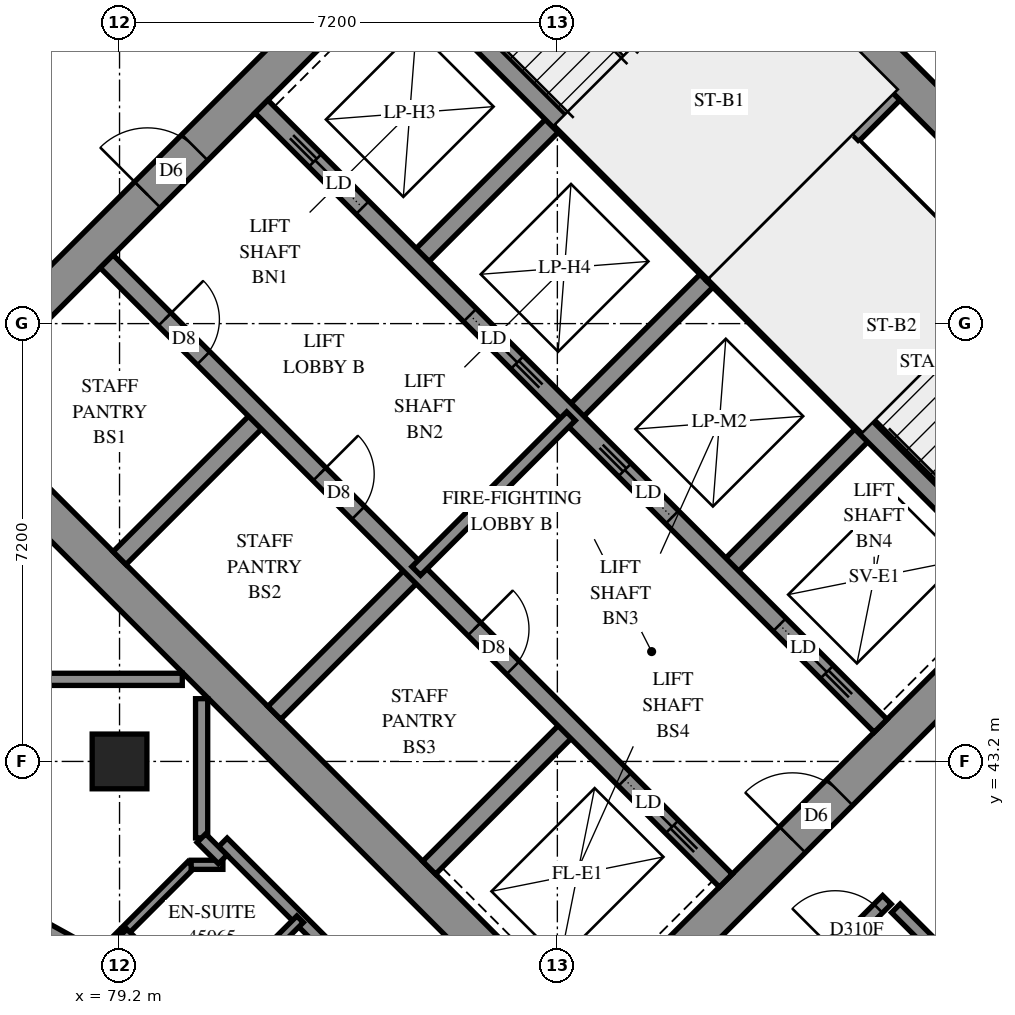
"""IFC4 building model, lengths in metres.
Left out: names, types, materials, properties, quantities, classifications, styles, units other than length and angle.
Written with IfcOpenShell. Run it as: python <this file> out.ifc"""

import sys

from ifc_helpers import new_model, si_unit, direction, frame, frame_2d, origin, origin_2d, place, context, subcontext, project, spatial, polyline, rectangle, outline, extrude, element, fill, save


model = new_model("IFC4")
c1 = context("Model", 3, precision=1e-05, world=origin(), true_north=direction((0.0, 1.0)))
c2 = subcontext(c1, "Body", "Model", "MODEL_VIEW")
j1 = project(units=[si_unit("LENGTHUNIT", "METRE"), si_unit("PLANEANGLEUNIT", "RADIAN")], contexts=[c1])
p1 = place(None, origin())
s1 = spatial("IfcSite", under=j1, at=p1, CompositionType="ELEMENT")
p2 = place(p1, origin())
s2 = spatial("IfcBuilding", under=s1, at=p2, CompositionType="ELEMENT")
p3 = place(p2, frame((0.0, 0.0, 166.0)))
s3 = spatial("IfcBuildingStorey", under=s2, at=p3, CompositionType="ELEMENT", Elevation=166.0)
p4 = place(p3, frame((79.2, 43.2, 0.0), z_axis=(0.0, 0.0, 1.0), x_axis=(1.0, 0.0, 0.0)))
e1 = element("IfcColumn", 1, at=p4, inside=s3, PredefinedType="COLUMN", context=c2, shape_type="SweptSolid", body=[
    extrude(rectangle(XDim=0.9, YDim=0.9, at=origin_2d()), origin(), (0.0, 0.0, 1.0), 3.1),
])
p5 = place(p3, frame((76.018, 49.302, -0.3), z_axis=(0.0, 0.0, 1.0), x_axis=(0.7071067812, -0.7071067812, 0.0)))
e2 = element("IfcWall", 2, at=p5, inside=s3, PredefinedType="SHEAR", context=c2, shape_type="SweptSolid", body=[
    extrude(rectangle(XDim=15.6, YDim=0.6, at=frame_2d((7.8, 0.0))), origin(), (0.0, 0.0, 1.0), 2.7),
])
p6 = place(p3, frame((86.625, 59.908, -0.3), z_axis=(0.0, 0.0, 1.0), x_axis=(0.7071067812, -0.7071067812, 0.0)))
e3 = element("IfcWall", 3, at=p6, inside=s3, PredefinedType="SHEAR", context=c2, shape_type="SweptSolid", body=[
    extrude(rectangle(XDim=15.6, YDim=0.6, at=frame_2d((7.8, 0.0))), origin(), (0.0, 0.0, 1.0), 2.7),
])
p7 = place(p6, frame((10.6, 0.0, 0.3)))
e4 = element("IfcOpeningElement", 4, at=p7, cuts=e3, PredefinedType="OPENING", context=c2, shape_type="SweptSolid", body=[
    extrude(rectangle(XDim=0.8, YDim=2.1, at=frame_2d((0.4, 1.05))), frame((0.0, 0.31, 0.0), z_axis=(0.0, -1.0, 0.0), x_axis=(1.0, 0.0, 0.0)), (0.0, 0.0, 1.0), 0.62),
])
p8 = place(p3, frame((76.442, 49.302, -0.3), z_axis=(0.0, 0.0, 1.0), x_axis=(0.7071067812, 0.7071067812, 0.0)))
e5 = element("IfcWall", 5, at=p8, inside=s3, PredefinedType="SHEAR", context=c2, shape_type="SweptSolid", body=[
    extrude(rectangle(XDim=14.4, YDim=0.6, at=frame_2d((7.2, 0.0))), origin(), (0.0, 0.0, 1.0), 2.7),
])
p9 = place(p8, frame((4.55, 0.0, 0.3)))
e6 = element("IfcOpeningElement", 6, at=p9, cuts=e5, PredefinedType="OPENING", context=c2, shape_type="SweptSolid", body=[
    extrude(rectangle(XDim=1.1, YDim=2.1, at=frame_2d((0.55, 1.05))), frame((0.0, 0.31, 0.0), z_axis=(0.0, -1.0, 0.0), x_axis=(1.0, 0.0, 0.0)), (0.0, 0.0, 1.0), 0.62),
])
p10 = place(p8, frame((11.35, 0.0, 0.3)))
e7 = element("IfcOpeningElement", 7, at=p10, cuts=e5, PredefinedType="OPENING", context=c2, shape_type="SweptSolid", body=[
    extrude(rectangle(XDim=1.1, YDim=2.1, at=frame_2d((0.55, 1.05))), frame((0.0, 0.31, 0.0), z_axis=(0.0, -1.0, 0.0), x_axis=(1.0, 0.0, 0.0)), (0.0, 0.0, 1.0), 0.62),
])
p11 = place(p3, frame((87.049, 38.695, -0.3), z_axis=(0.0, 0.0, 1.0), x_axis=(0.7071067812, 0.7071067812, 0.0)))
e8 = element("IfcWall", 8, at=p11, inside=s3, PredefinedType="SHEAR", context=c2, shape_type="SweptSolid", body=[
    extrude(rectangle(XDim=14.4, YDim=0.6, at=frame_2d((7.2, 0.0))), origin(), (0.0, 0.0, 1.0), 2.7),
])
p12 = place(p11, frame((4.55, 0.0, 0.3)))
e9 = element("IfcOpeningElement", 9, at=p12, cuts=e8, PredefinedType="OPENING", context=c2, shape_type="SweptSolid", body=[
    extrude(rectangle(XDim=1.1, YDim=2.1, at=frame_2d((0.55, 1.05))), frame((0.0, 0.31, 0.0), z_axis=(0.0, -1.0, 0.0), x_axis=(1.0, 0.0, 0.0)), (0.0, 0.0, 1.0), 0.62),
])
p13 = place(p11, frame((11.35, 0.0, 0.3)))
e10 = element("IfcOpeningElement", 10, at=p13, cuts=e8, PredefinedType="OPENING", context=c2, shape_type="SweptSolid", body=[
    extrude(rectangle(XDim=1.1, YDim=2.1, at=frame_2d((0.55, 1.05))), frame((0.0, 0.31, 0.0), z_axis=(0.0, -1.0, 0.0), x_axis=(1.0, 0.0, 0.0)), (0.0, 0.0, 1.0), 0.62),
])
for number, where, z_axis, x_axis in (
    (11, (79.2, 46.544, 0.0), (0.0, 0.0, 1.0), (0.707, 0.707, 0.0)),
    (12, (84.079, 51.423, 0.0), (0.0, 0.0, 1.0), (0.707, 0.707, 0.0)),
):
    element("IfcWall", number, at=place(p3, frame(where, z_axis=z_axis, x_axis=x_axis)), inside=s3, PredefinedType="SOLIDWALL", context=c2, shape_type="SweptSolid", body=[
        extrude(rectangle(XDim=3.3, YDim=0.3, at=frame_2d((1.65, 0.0))), origin(), (0.0, 0.0, 1.0), 3.1),
    ])
p14 = place(p3, frame((81.746, 43.999, 0.0), z_axis=(0.0, 0.0, 1.0), x_axis=(0.7071067812, 0.7071067812, 0.0)))
e13 = element("IfcWall", 13, at=p14, inside=s3, PredefinedType="SOLIDWALL", context=c2, shape_type="SweptSolid", body=[
    extrude(rectangle(XDim=3.3, YDim=0.3, at=frame_2d((1.65, 0.0))), origin(), (0.0, 0.0, 1.0), 3.1),
])
p15 = place(p3, frame((86.625, 48.878, 0.0), z_axis=(0.0, 0.0, 1.0), x_axis=(0.7071067812, 0.7071067812, 0.0)))
e14 = element("IfcWall", 14, at=p15, inside=s3, PredefinedType="SOLIDWALL", context=c2, shape_type="SweptSolid", body=[
    extrude(rectangle(XDim=3.3, YDim=0.3, at=frame_2d((1.65, 0.0))), origin(), (0.0, 0.0, 1.0), 3.1),
])
p16 = place(p3, frame((84.291, 41.453, 0.0), z_axis=(0.0, 0.0, 1.0), x_axis=(0.7071067812, 0.7071067812, 0.0)))
e15 = element("IfcWall", 15, at=p16, inside=s3, PredefinedType="SOLIDWALL", context=c2, shape_type="SweptSolid", body=[
    extrude(rectangle(XDim=3.3, YDim=0.3, at=frame_2d((1.65, 0.0))), origin(), (0.0, 0.0, 1.0), 3.1),
])
p17 = place(p3, frame((89.17, 46.332, 0.0), z_axis=(0.0, 0.0, 1.0), x_axis=(0.7071067812, 0.7071067812, 0.0)))
e16 = element("IfcWall", 16, at=p17, inside=s3, PredefinedType="SOLIDWALL", context=c2, shape_type="SweptSolid", body=[
    extrude(rectangle(XDim=3.3, YDim=0.3, at=frame_2d((1.65, 0.0))), origin(), (0.0, 0.0, 1.0), 3.1),
])
p18 = place(p3, frame((78.988, 51.423, 0.0), z_axis=(0.0, 0.0, 1.0), x_axis=(0.7071067812, -0.7071067812, 0.0)))
e17 = element("IfcWall", 17, at=p18, inside=s3, PredefinedType="SOLIDWALL", context=c2, shape_type="SweptSolid", body=[
    extrude(rectangle(XDim=14.4, YDim=0.3, at=frame_2d((7.2, 0.0))), origin(), (0.0, 0.0, 1.0), 3.1),
])
p19 = place(p18, frame((1.35, 0.0, 0.0)))
e18 = element("IfcOpeningElement", 18, at=p19, cuts=e17, PredefinedType="OPENING", context=c2, shape_type="SweptSolid", body=[
    extrude(rectangle(XDim=0.9, YDim=2.1, at=frame_2d((0.45, 1.05))), frame((0.0, 0.16, 0.0), z_axis=(0.0, -1.0, 0.0), x_axis=(1.0, 0.0, 0.0)), (0.0, 0.0, 1.0), 0.32),
])
p20 = place(p18, frame((4.95, 0.0, 0.0)))
e19 = element("IfcOpeningElement", 19, at=p20, cuts=e17, PredefinedType="OPENING", context=c2, shape_type="SweptSolid", body=[
    extrude(rectangle(XDim=0.9, YDim=2.1, at=frame_2d((0.45, 1.05))), frame((0.0, 0.16, 0.0), z_axis=(0.0, -1.0, 0.0), x_axis=(1.0, 0.0, 0.0)), (0.0, 0.0, 1.0), 0.32),
])
p21 = place(p18, frame((8.55, 0.0, 0.0)))
e20 = element("IfcOpeningElement", 20, at=p21, cuts=e17, PredefinedType="OPENING", context=c2, shape_type="SweptSolid", body=[
    extrude(rectangle(XDim=0.9, YDim=2.1, at=frame_2d((0.45, 1.05))), frame((0.0, 0.16, 0.0), z_axis=(0.0, -1.0, 0.0), x_axis=(1.0, 0.0, 0.0)), (0.0, 0.0, 1.0), 0.32),
])
p22 = place(p18, frame((12.05, 0.0, 0.0)))
e21 = element("IfcOpeningElement", 21, at=p22, cuts=e17, PredefinedType="OPENING", context=c2, shape_type="SweptSolid", body=[
    extrude(rectangle(XDim=1.1, YDim=2.1, at=frame_2d((0.55, 1.05))), frame((0.0, 0.16, 0.0), z_axis=(0.0, -1.0, 0.0), x_axis=(1.0, 0.0, 0.0)), (0.0, 0.0, 1.0), 0.32),
])
p23 = place(p3, frame((81.534, 53.969, 0.0), z_axis=(0.0, 0.0, 1.0), x_axis=(0.707103309, -0.7071102534, 0.0)))
e22 = element("IfcWall", 22, at=p23, inside=s3, PredefinedType="SOLIDWALL", context=c2, shape_type="SweptSolid", body=[
    extrude(rectangle(XDim=14.4, YDim=0.3, at=frame_2d((7.2, 0.0))), origin(), (0.0, 0.0, 1.0), 3.1),
])
p24 = place(p23, frame((1.25, 0.0, 0.0)))
e23 = element("IfcOpeningElement", 23, at=p24, cuts=e22, PredefinedType="OPENING", context=c2, shape_type="SweptSolid", body=[
    extrude(rectangle(XDim=1.1, YDim=2.1, at=frame_2d((0.55, 1.05))), frame((0.0, 0.16, 0.0), z_axis=(0.0, -1.0, 0.0), x_axis=(1.0, 0.0, 0.0)), (0.0, 0.0, 1.0), 0.32),
])
p25 = place(p23, frame((4.85, 0.0, 0.0)))
e24 = element("IfcOpeningElement", 24, at=p25, cuts=e22, PredefinedType="OPENING", context=c2, shape_type="SweptSolid", body=[
    extrude(rectangle(XDim=1.1, YDim=2.1, at=frame_2d((0.55, 1.05))), frame((0.0, 0.16, 0.0), z_axis=(0.0, -1.0, 0.0), x_axis=(1.0, 0.0, 0.0)), (0.0, 0.0, 1.0), 0.32),
])
p26 = place(p23, frame((8.45, 0.0, 0.0)))
e25 = element("IfcOpeningElement", 25, at=p26, cuts=e22, PredefinedType="OPENING", context=c2, shape_type="SweptSolid", body=[
    extrude(rectangle(XDim=1.1, YDim=2.1, at=frame_2d((0.55, 1.05))), frame((0.0, 0.16, 0.0), z_axis=(0.0, -1.0, 0.0), x_axis=(1.0, 0.0, 0.0)), (0.0, 0.0, 1.0), 0.32),
])
p27 = place(p23, frame((12.05, 0.0, 0.0)))
e26 = element("IfcOpeningElement", 26, at=p27, cuts=e22, PredefinedType="OPENING", context=c2, shape_type="SweptSolid", body=[
    extrude(rectangle(XDim=1.1, YDim=2.1, at=frame_2d((0.55, 1.05))), frame((0.0, 0.16, 0.0), z_axis=(0.0, -1.0, 0.0), x_axis=(1.0, 0.0, 0.0)), (0.0, 0.0, 1.0), 0.32),
])
for number, where, z_axis, x_axis in (
    (27, (83.867, 56.302, 0.0), (0.0, 0.0, 1.0), (0.707, -0.707, 0.0)),
    (28, (88.958, 51.211, 0.0), (0.0, 0.0, 1.0), (0.707, -0.707, 0.0)),
):
    element("IfcWall", number, at=place(p3, frame(where, z_axis=z_axis, x_axis=x_axis)), inside=s3, PredefinedType="SOLIDWALL", context=c2, shape_type="SweptSolid", body=[
        extrude(rectangle(XDim=7.2, YDim=0.3, at=frame_2d((3.6, 0.0))), origin(), (0.0, 0.0, 1.0), 3.1),
    ])
p28 = place(p3, frame((88.958, 51.211, 0.0), z_axis=(0.0, 0.0, 1.0), x_axis=(0.7071067812, 0.7071067812, 0.0)))
e29 = element("IfcWall", 29, at=p28, inside=s3, PredefinedType="SOLIDWALL", context=c2, shape_type="SweptSolid", body=[
    extrude(rectangle(XDim=4.2, YDim=0.3, at=frame_2d((2.1, 0.0))), origin(), (0.0, 0.0, 1.0), 3.1),
])
p29 = place(p3, frame((76.572, 41.057, 0.0), z_axis=(0.0, 0.0, 1.0), x_axis=(0.8758607795, -0.4825638765, 0.0)))
e30 = element("IfcWall", 30, at=p29, inside=s3, PredefinedType="SOLIDWALL", context=c2, shape_type="SweptSolid", body=[
    extrude(outline(polyline([(0.022, -0.25), (4.236, -0.25), (4.343, 0.25), (-0.022, 0.25), (0.022, -0.25)])), origin(), (0.0, 0.0, 1.0), 3.1),
])
p30 = place(p29, frame((0.322, 0.0, 0.45)))
e31 = element("IfcOpeningElement", 31, at=p30, cuts=e30, PredefinedType="OPENING", context=c2, shape_type="SweptSolid", body=[
    extrude(rectangle(XDim=1.2, YDim=2.5, at=frame_2d((0.6, 1.25))), frame((0.0, 0.26, 0.0), z_axis=(0.0, -1.0, 0.0), x_axis=(1.0, 0.0, 0.0)), (0.0, 0.0, 1.0), 0.52),
])
p31 = place(p29, frame((2.666, 0.0, 0.45)))
e32 = element("IfcOpeningElement", 32, at=p31, cuts=e30, PredefinedType="OPENING", context=c2, shape_type="SweptSolid", body=[
    extrude(rectangle(XDim=1.2, YDim=2.5, at=frame_2d((0.6, 1.25))), frame((0.0, 0.26, 0.0), z_axis=(0.0, -1.0, 0.0), x_axis=(1.0, 0.0, 0.0)), (0.0, 0.0, 1.0), 0.52),
])
p32 = place(p3, frame((91.313, 53.354, 0.0), z_axis=(0.0, 0.0, 1.0), x_axis=(0.7071140275, -0.7070995348, 0.0)))
e33 = element("IfcWall", 33, at=p32, inside=s3, PredefinedType="PARTITIONING", context=c2, shape_type="SweptSolid", body=[
    extrude(rectangle(XDim=6.9, YDim=0.15, at=frame_2d((3.45, 0.0))), origin(), (0.0, 0.0, 1.0), 3.1),
])
p33 = place(p3, frame((84.079, 46.332, 0.0), z_axis=(0.0, 0.0, 1.0), x_axis=(0.7071067812, 0.7071067812, 0.0)))
e34 = element("IfcWall", 34, at=p33, inside=s3, PredefinedType="PARTITIONING", context=c2, shape_type="SweptSolid", body=[
    extrude(rectangle(XDim=3.6, YDim=0.2, at=frame_2d((1.8, 0.0))), origin(), (0.0, 0.0, 1.0), 3.1),
])
p34 = place(p3, frame((91.967, 40.785, 0.0), z_axis=(0.0, 0.0, 1.0), x_axis=(0.7071067812, -0.7071067812, 0.0)))
e35 = element("IfcWall", 35, at=p34, inside=s3, PredefinedType="PARTITIONING", context=c2, shape_type="SweptSolid", body=[
    extrude(rectangle(XDim=12.1, YDim=0.2, at=frame_2d((6.05, 0.0))), origin(), (0.0, 0.0, 1.0), 3.1),
])
p35 = place(p34, frame((3.448, 0.0, 0.0)))
e36 = element("IfcOpeningElement", 36, at=p35, cuts=e35, PredefinedType="OPENING", context=c2, shape_type="SweptSolid", body=[
    extrude(rectangle(XDim=0.9, YDim=2.1, at=frame_2d((0.45, 1.05))), frame((0.0, 0.11, 0.0), z_axis=(0.0, -1.0, 0.0), x_axis=(1.0, 0.0, 0.0)), (0.0, 0.0, 1.0), 0.22),
])
p36 = place(p34, frame((8.457, 0.0, 0.0)))
e37 = element("IfcOpeningElement", 37, at=p36, cuts=e35, PredefinedType="OPENING", context=c2, shape_type="SweptSolid", body=[
    extrude(rectangle(XDim=1.0, YDim=2.1, at=frame_2d((0.5, 1.05))), frame((0.0, 0.11, 0.0), z_axis=(0.0, -1.0, 0.0), x_axis=(1.0, 0.0, 0.0)), (0.0, 0.0, 1.0), 0.22),
])
p37 = place(p3, frame((91.755, 57.317, 0.0), z_axis=(0.0, 0.0, 1.0), x_axis=(0.7071067812, -0.7071067812, 0.0)))
e38 = element("IfcWall", 38, at=p37, inside=s3, PredefinedType="PARTITIONING", context=c2, shape_type="SweptSolid", body=[
    extrude(rectangle(XDim=11.639, YDim=0.2, at=frame_2d((5.819, 0.0))), origin(), (0.0, 0.0, 1.0), 3.1),
])
p38 = place(p3, frame((80.899, 41.869, 0.0), z_axis=(0.0, 0.0, 1.0), x_axis=(0.7071067812, -0.7071067812, 0.0)))
e39 = element("IfcWall", 39, at=p38, inside=s3, PredefinedType="PARTITIONING", context=c2, shape_type="SweptSolid", body=[
    extrude(rectangle(XDim=8.392, YDim=0.2, at=frame_2d((4.196, 0.0))), origin(), (0.0, 0.0, 1.0), 3.1),
])
p39 = place(p38, frame((4.979, 0.0, 0.0)))
e40 = element("IfcOpeningElement", 40, at=p39, cuts=e39, PredefinedType="OPENING", context=c2, shape_type="SweptSolid", body=[
    extrude(rectangle(XDim=0.9, YDim=2.1, at=frame_2d((0.45, 1.05))), frame((0.0, 0.11, 0.0), z_axis=(0.0, -1.0, 0.0), x_axis=(1.0, 0.0, 0.0)), (0.0, 0.0, 1.0), 0.22),
])
p40 = place(p3, frame((86.834, 35.94, 0.0), z_axis=(0.0, 0.0, 1.0), x_axis=(0.7072486139, 0.7069649201, 0.0)))
e41 = element("IfcWall", 41, at=p40, inside=s3, PredefinedType="PARTITIONING", context=c2, shape_type="SweptSolid", body=[
    extrude(rectangle(XDim=7.05, YDim=0.2, at=frame_2d((3.525, 0.0))), origin(), (0.0, 0.0, 1.0), 3.1),
])
p41 = place(p40, frame((5.848, 0.0, 0.0)))
e42 = element("IfcOpeningElement", 42, at=p41, cuts=e41, PredefinedType="OPENING", context=c2, shape_type="SweptSolid", body=[
    extrude(rectangle(XDim=1.0, YDim=2.1, at=frame_2d((0.5, 1.05))), frame((0.0, 0.11, 0.0), z_axis=(0.0, -1.0, 0.0), x_axis=(1.0, 0.0, 0.0)), (0.0, 0.0, 1.0), 0.22),
])
for number, where, z_axis, x_axis in (
    (43, (77.942, 44.55, 0.0), (0.0, 0.0, 1.0), (1.0, 0.0, 0.0)),
    (44, (80.55, 41.942, 0.0), (0.0, 0.0, 1.0), (0.0, 1.0, 0.0)),
):
    element("IfcWall", number, at=place(p3, frame(where, z_axis=z_axis, x_axis=x_axis)), inside=s3, PredefinedType="PARTITIONING", context=c2, shape_type="SweptSolid", body=[
        extrude(rectangle(XDim=2.29, YDim=0.2, at=frame_2d((1.145, 0.0))), origin(), (0.0, 0.0, 1.0), 3.1),
    ])
p42 = place(p3, frame((80.603, 39.039, 0.0), z_axis=(0.0, 0.0, 1.0), x_axis=(0.7071293598, 0.7070842018, 0.0)))
e45 = element("IfcWall", 45, at=p42, inside=s3, PredefinedType="PARTITIONING", context=c2, shape_type="SweptSolid", body=[
    extrude(rectangle(XDim=2.214, YDim=0.15, at=frame_2d((1.107, 0.0))), origin(), (0.0, 0.0, 1.0), 3.1),
])
p43 = place(p42, frame((0.177, 0.0, 0.0)))
e46 = element("IfcOpeningElement", 46, at=p43, cuts=e45, PredefinedType="OPENING", context=c2, shape_type="SweptSolid", body=[
    extrude(rectangle(XDim=0.8, YDim=2.1, at=frame_2d((0.4, 1.05))), frame((0.0, 0.085, 0.0), z_axis=(0.0, -1.0, 0.0), x_axis=(1.0, 0.0, 0.0)), (0.0, 0.0, 1.0), 0.17),
])
p44 = place(p3, frame((78.924, 40.047, 0.0), z_axis=(0.0, 0.0, 1.0), x_axis=(0.7071067812, 0.7071067812, 0.0)))
e47 = element("IfcWall", 47, at=p44, inside=s3, PredefinedType="PARTITIONING", context=c2, shape_type="SweptSolid", body=[
    extrude(rectangle(XDim=2.056, YDim=0.15, at=frame_2d((1.028, 0.0))), origin(), (0.0, 0.0, 1.0), 3.1),
])
p45 = place(p3, frame((79.267, 40.389, 0.0), z_axis=(0.0, 0.0, 1.0), x_axis=(0.7071375765, -0.7070759845, 0.0)))
e48 = element("IfcWall", 48, at=p45, inside=s3, PredefinedType="PARTITIONING", context=c2, shape_type="SweptSolid", body=[
    extrude(rectangle(XDim=1.624, YDim=0.15, at=frame_2d((0.812, 0.0))), origin(), (0.0, 0.0, 1.0), 3.1),
])
p46 = place(p3, frame((80.378, 41.5, 0.0), z_axis=(0.0, 0.0, 1.0), x_axis=(1.0, 0.0, 0.0)))
e49 = element("IfcWall", 49, at=p46, inside=s3, PredefinedType="PARTITIONING", context=c2, shape_type="SweptSolid", body=[
    extrude(rectangle(XDim=0.522, YDim=0.15, at=frame_2d((0.261, 0.0))), origin(), (0.0, 0.0, 1.0), 3.1),
])
p47 = place(p3, frame((80.546, 41.938, 0.0), z_axis=(0.0, 0.0, 1.0), x_axis=(0.7071067812, -0.7071067812, 0.0)))
e50 = element("IfcWall", 50, at=p47, inside=s3, PredefinedType="PARTITIONING", context=c2, shape_type="SweptSolid", body=[
    extrude(rectangle(XDim=0.495, YDim=0.2, at=frame_2d((0.247, 0.0))), origin(), (0.0, 0.0, 1.0), 3.1),
])
p48 = place(p9, origin())
e51 = element("IfcDoor", 51, at=p48, inside=s3, OperationType="DOUBLE_DOOR_SINGLE_SWING", PredefinedType="DOOR", context=c2, shape_type="SweptSolid", body=[
    extrude(rectangle(XDim=1.1, YDim=2.1, at=frame_2d((0.55, 1.05))), frame((0.0, 0.025, 0.0), z_axis=(0.0, -1.0, 0.0), x_axis=(1.0, 0.0, 0.0)), (0.0, 0.0, 1.0), 0.05),
])
fill(e6, e51)
p49 = place(p12, origin())
e52 = element("IfcDoor", 52, at=p49, inside=s3, OperationType="DOUBLE_DOOR_SINGLE_SWING", PredefinedType="DOOR", context=c2, shape_type="SweptSolid", body=[
    extrude(rectangle(XDim=1.1, YDim=2.1, at=frame_2d((0.55, 1.05))), frame((0.0, 0.025, 0.0), z_axis=(0.0, -1.0, 0.0), x_axis=(1.0, 0.0, 0.0)), (0.0, 0.0, 1.0), 0.05),
])
fill(e9, e52)
p50 = place(p19, origin())
e53 = element("IfcDoor", 53, at=p50, inside=s3, OperationType="SINGLE_SWING_LEFT", PredefinedType="DOOR", context=c2, shape_type="SweptSolid", body=[
    extrude(rectangle(XDim=0.9, YDim=2.1, at=frame_2d((0.45, 1.05))), frame((0.0, 0.025, 0.0), z_axis=(0.0, -1.0, 0.0), x_axis=(1.0, 0.0, 0.0)), (0.0, 0.0, 1.0), 0.05),
])
fill(e18, e53)
p51 = place(p20, origin())
e54 = element("IfcDoor", 54, at=p51, inside=s3, OperationType="SINGLE_SWING_LEFT", PredefinedType="DOOR", context=c2, shape_type="SweptSolid", body=[
    extrude(rectangle(XDim=0.9, YDim=2.1, at=frame_2d((0.45, 1.05))), frame((0.0, 0.025, 0.0), z_axis=(0.0, -1.0, 0.0), x_axis=(1.0, 0.0, 0.0)), (0.0, 0.0, 1.0), 0.05),
])
fill(e19, e54)
p52 = place(p21, origin())
e55 = element("IfcDoor", 55, at=p52, inside=s3, OperationType="SINGLE_SWING_LEFT", PredefinedType="DOOR", context=c2, shape_type="SweptSolid", body=[
    extrude(rectangle(XDim=0.9, YDim=2.1, at=frame_2d((0.45, 1.05))), frame((0.0, 0.025, 0.0), z_axis=(0.0, -1.0, 0.0), x_axis=(1.0, 0.0, 0.0)), (0.0, 0.0, 1.0), 0.05),
])
fill(e20, e55)
p53 = place(p22, origin())
e56 = element("IfcDoor", 56, at=p53, inside=s3, OperationType="SLIDING_TO_RIGHT", PredefinedType="DOOR", context=c2, shape_type="SweptSolid", body=[
    extrude(rectangle(XDim=1.1, YDim=2.1, at=frame_2d((0.55, 1.05))), frame((0.0, 0.025, 0.0), z_axis=(0.0, -1.0, 0.0), x_axis=(1.0, 0.0, 0.0)), (0.0, 0.0, 1.0), 0.05),
])
fill(e21, e56)
p54 = place(p24, origin())
e57 = element("IfcDoor", 57, at=p54, inside=s3, OperationType="SLIDING_TO_LEFT", PredefinedType="DOOR", context=c2, shape_type="SweptSolid", body=[
    extrude(rectangle(XDim=1.1, YDim=2.1, at=frame_2d((0.55, 1.05))), frame((0.0, 0.025, 0.0), z_axis=(0.0, -1.0, 0.0), x_axis=(1.0, 0.0, 0.0)), (0.0, 0.0, 1.0), 0.05),
])
fill(e23, e57)
p55 = place(p25, origin())
e58 = element("IfcDoor", 58, at=p55, inside=s3, OperationType="SLIDING_TO_RIGHT", PredefinedType="DOOR", context=c2, shape_type="SweptSolid", body=[
    extrude(rectangle(XDim=1.1, YDim=2.1, at=frame_2d((0.55, 1.05))), frame((0.0, 0.025, 0.0), z_axis=(0.0, -1.0, 0.0), x_axis=(1.0, 0.0, 0.0)), (0.0, 0.0, 1.0), 0.05),
])
fill(e24, e58)
p56 = place(p26, origin())
e59 = element("IfcDoor", 59, at=p56, inside=s3, OperationType="SLIDING_TO_LEFT", PredefinedType="DOOR", context=c2, shape_type="SweptSolid", body=[
    extrude(rectangle(XDim=1.1, YDim=2.1, at=frame_2d((0.55, 1.05))), frame((0.0, 0.025, 0.0), z_axis=(0.0, -1.0, 0.0), x_axis=(1.0, 0.0, 0.0)), (0.0, 0.0, 1.0), 0.05),
])
fill(e25, e59)
p57 = place(p27, origin())
e60 = element("IfcDoor", 60, at=p57, inside=s3, OperationType="SLIDING_TO_RIGHT", PredefinedType="DOOR", context=c2, shape_type="SweptSolid", body=[
    extrude(rectangle(XDim=1.1, YDim=2.1, at=frame_2d((0.55, 1.05))), frame((0.0, 0.025, 0.0), z_axis=(0.0, -1.0, 0.0), x_axis=(1.0, 0.0, 0.0)), (0.0, 0.0, 1.0), 0.05),
])
fill(e26, e60)
p58 = place(p41, origin())
e61 = element("IfcDoor", 61, at=p58, inside=s3, OperationType="SINGLE_SWING_RIGHT", PredefinedType="DOOR", context=c2, shape_type="SweptSolid", body=[
    extrude(rectangle(XDim=1.0, YDim=2.1, at=frame_2d((0.5, 1.05))), frame((0.0, 0.025, 0.0), z_axis=(0.0, -1.0, 0.0), x_axis=(1.0, 0.0, 0.0)), (0.0, 0.0, 1.0), 0.05),
])
fill(e42, e61)
save(model, sys.argv[1])
